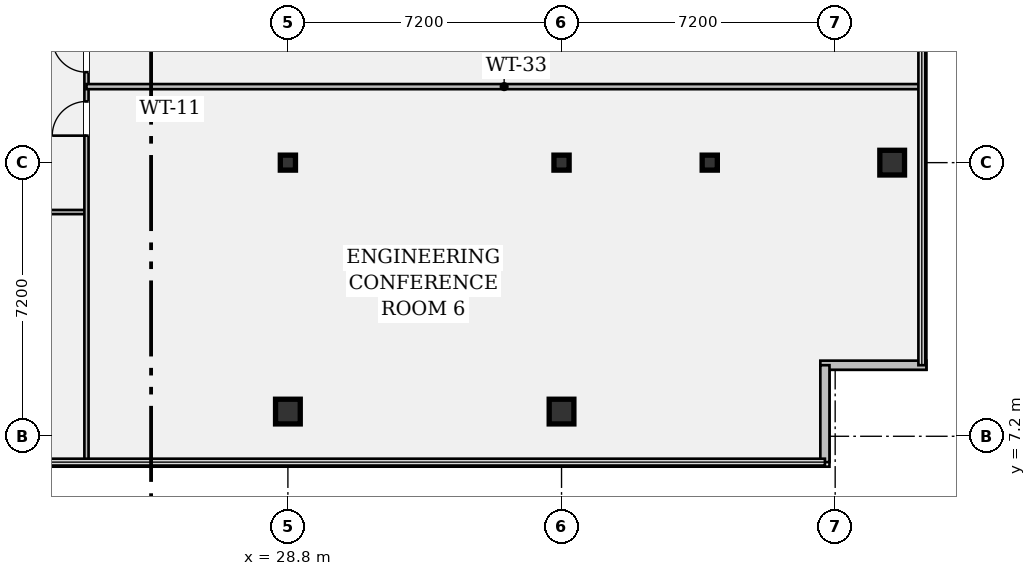
"""IFC4 building model, lengths in metres.
Left out: names, types, materials, properties, quantities, classifications, styles, units other than length and angle.
Written with IfcOpenShell. Run it as: python <this file> out.ifc"""

import sys

from ifc_helpers import new_model, si_unit, direction, frame, frame_2d, origin, origin_2d, place, context, subcontext, project, spatial, rectangle, hollow_rectangle, i_section, extrude, element, fill, save


model = new_model("IFC4")
c1 = context("Model", 3, precision=1e-05, world=origin(), true_north=direction((0.0, 1.0)))
c2 = subcontext(c1, "Body", "Model", "MODEL_VIEW")
j1 = project(units=[si_unit("LENGTHUNIT", "METRE"), si_unit("PLANEANGLEUNIT", "RADIAN")], contexts=[c1])
p1 = place(None, origin())
s1 = spatial("IfcSite", under=j1, at=p1, CompositionType="ELEMENT")
p2 = place(p1, origin())
s2 = spatial("IfcBuilding", under=s1, at=p2, CompositionType="ELEMENT")
p3 = place(p2, frame((0.0, 0.0, 258.65)))
s3 = spatial("IfcBuildingStorey", under=s2, at=p3, CompositionType="ELEMENT", Elevation=258.65)
p4 = place(p3, frame((28.8, 7.85, 0.0), z_axis=(0.0, 0.0, 1.0), x_axis=(1.0, 0.0, 0.0)))
e1 = element("IfcColumn", 1, at=p4, inside=s3, PredefinedType="COLUMN", context=c2, shape_type="SweptSolid", body=[
    extrude(hollow_rectangle(XDim=0.65, YDim=0.65, WallThickness=0.04, at=origin_2d()), origin(), (0.0, 0.0, 1.0), 3.24),
])
p5 = place(p3, frame((28.8, 14.4, 0.0), z_axis=(0.0, 0.0, 1.0), x_axis=(1.0, 0.0, 0.0)))
e2 = element("IfcColumn", 2, at=p5, inside=s3, PredefinedType="COLUMN", context=c2, shape_type="SweptSolid", body=[
    extrude(i_section(OverallWidth=0.399, OverallDepth=0.394, WebThickness=0.023, FlangeThickness=0.037, FilletRadius=0.018, at=origin_2d()), origin(), (0.0, 0.0, 1.0), 3.24),
])
p6 = place(p3, frame((36.0, 7.85, 0.0), z_axis=(0.0, 0.0, 1.0), x_axis=(1.0, 0.0, 0.0)))
e3 = element("IfcColumn", 3, at=p6, inside=s3, PredefinedType="COLUMN", context=c2, shape_type="SweptSolid", body=[
    extrude(hollow_rectangle(XDim=0.65, YDim=0.65, WallThickness=0.04, at=origin_2d()), origin(), (0.0, 0.0, 1.0), 3.24),
])
for number, where, z_axis, x_axis in (
    (4, (36.0, 14.4, 0.0), (0.0, 0.0, 1.0), (1.0, 0.0, 0.0)),
    (5, (39.9, 14.4, 0.0), (0.0, 0.0, 1.0), (1.0, 0.0, 0.0)),
):
    element("IfcColumn", number, at=place(p3, frame(where, z_axis=z_axis, x_axis=x_axis)), inside=s3, PredefinedType="COLUMN", context=c2, shape_type="SweptSolid", body=[
        extrude(i_section(OverallWidth=0.399, OverallDepth=0.394, WebThickness=0.023, FlangeThickness=0.037, FilletRadius=0.018, at=origin_2d()), origin(), (0.0, 0.0, 1.0), 3.24),
    ])
p7 = place(p3, frame((44.7, 14.4, 0.0), z_axis=(0.0, 0.0, 1.0), x_axis=(1.0, 0.0, 0.0)))
e6 = element("IfcColumn", 6, at=p7, inside=s3, PredefinedType="COLUMN", context=c2, shape_type="SweptSolid", body=[
    extrude(hollow_rectangle(XDim=0.65, YDim=0.65, WallThickness=0.04, at=origin_2d()), origin(), (0.0, 0.0, 1.0), 3.24),
])
p8 = place(p3, frame((45.6, 9.07, 0.0), z_axis=(0.0, 0.0, 1.0), x_axis=(-1.0, 0.0, 0.0)))
e7 = element("IfcWall", 7, at=p8, inside=s3, PredefinedType="STANDARD", context=c2, shape_type="SweptSolid", body=[
    extrude(rectangle(XDim=2.79, YDim=0.24, at=frame_2d((1.395, 0.0))), origin(), (0.0, 0.0, 1.0), 3.24),
])
p9 = place(p3, frame((42.93, 9.07, 0.0), z_axis=(0.0, 0.0, 1.0), x_axis=(0.0, -1.0, 0.0)))
e8 = element("IfcWall", 8, at=p9, inside=s3, PredefinedType="STANDARD", context=c2, shape_type="SweptSolid", body=[
    extrude(rectangle(XDim=2.55, YDim=0.24, at=frame_2d((1.275, 0.0))), origin(), (0.0, 0.0, 1.0), 3.24),
])
p10 = place(p3, frame((21.55, 13.1, 0.0), z_axis=(0.0, 0.0, 1.0), x_axis=(1.0, 0.0, 0.0)))
e9 = element("IfcWall", 9, at=p10, inside=s3, PredefinedType="PARTITIONING", context=c2, shape_type="SweptSolid", body=[
    extrude(rectangle(XDim=1.95, YDim=0.11, at=frame_2d((0.975, 0.0))), origin(), (0.0, 0.0, 1.0), 3.24),
])
p11 = place(p3, frame((23.5, 6.52, 0.0), z_axis=(0.0, 0.0, 1.0), x_axis=(0.0, 1.0, 0.0)))
e10 = element("IfcWall", 10, at=p11, inside=s3, PredefinedType="PARTITIONING", context=c2, shape_type="SweptSolid", body=[
    extrude(rectangle(XDim=18.56, YDim=0.11, at=frame_2d((9.28, 0.0))), origin(), (0.0, 0.0, 1.0), 2.676),
])
p12 = place(p11, frame((8.59, 0.0, 0.0)))
e11 = element("IfcOpeningElement", 11, at=p12, cuts=e10, PredefinedType="OPENING", context=c2, shape_type="SweptSolid", body=[
    extrude(rectangle(XDim=0.9, YDim=2.15, at=frame_2d((0.45, 1.075))), frame((0.0, 0.067, 0.0), z_axis=(0.0, -1.0, 0.0), x_axis=(1.0, 0.0, 0.0)), (0.0, 0.0, 1.0), 0.134),
])
p13 = place(p11, frame((10.26, 0.0, 0.0)))
e12 = element("IfcOpeningElement", 12, at=p13, cuts=e10, PredefinedType="OPENING", context=c2, shape_type="SweptSolid", body=[
    extrude(rectangle(XDim=0.9, YDim=2.15, at=frame_2d((0.45, 1.075))), frame((0.0, 0.067, 0.0), z_axis=(0.0, -1.0, 0.0), x_axis=(1.0, 0.0, 0.0)), (0.0, 0.0, 1.0), 0.134),
])
p14 = place(p3, frame((23.5, 16.4, 0.0), z_axis=(0.0, 0.0, 1.0), x_axis=(1.0, 0.0, 0.0)))
e13 = element("IfcWall", 13, at=p14, inside=s3, PredefinedType="PARTITIONING", context=c2, shape_type="SweptSolid", body=[
    extrude(rectangle(XDim=21.98, YDim=0.135, at=frame_2d((10.99, 0.0))), origin(), (0.0, 0.0, 1.0), 2.676),
])
p15 = place(p12, origin())
e14 = element("IfcDoor", 14, at=p15, inside=s3, OperationType="SINGLE_SWING_LEFT", PredefinedType="DOOR", context=c2, shape_type="SweptSolid", body=[
    extrude(rectangle(XDim=0.9, YDim=2.15, at=frame_2d((0.45, 1.075))), frame((0.0, 0.025, 0.0), z_axis=(0.0, -1.0, 0.0), x_axis=(1.0, 0.0, 0.0)), (0.0, 0.0, 1.0), 0.05),
])
fill(e11, e14)
p16 = place(p13, origin())
e15 = element("IfcDoor", 15, at=p16, inside=s3, OperationType="SINGLE_SWING_RIGHT", PredefinedType="DOOR", context=c2, shape_type="SweptSolid", body=[
    extrude(rectangle(XDim=0.9, YDim=2.15, at=frame_2d((0.45, 1.075))), frame((0.0, 0.025, 0.0), z_axis=(0.0, -1.0, 0.0), x_axis=(1.0, 0.0, 0.0)), (0.0, 0.0, 1.0), 0.05),
])
fill(e12, e15)
save(model, sys.argv[1])
